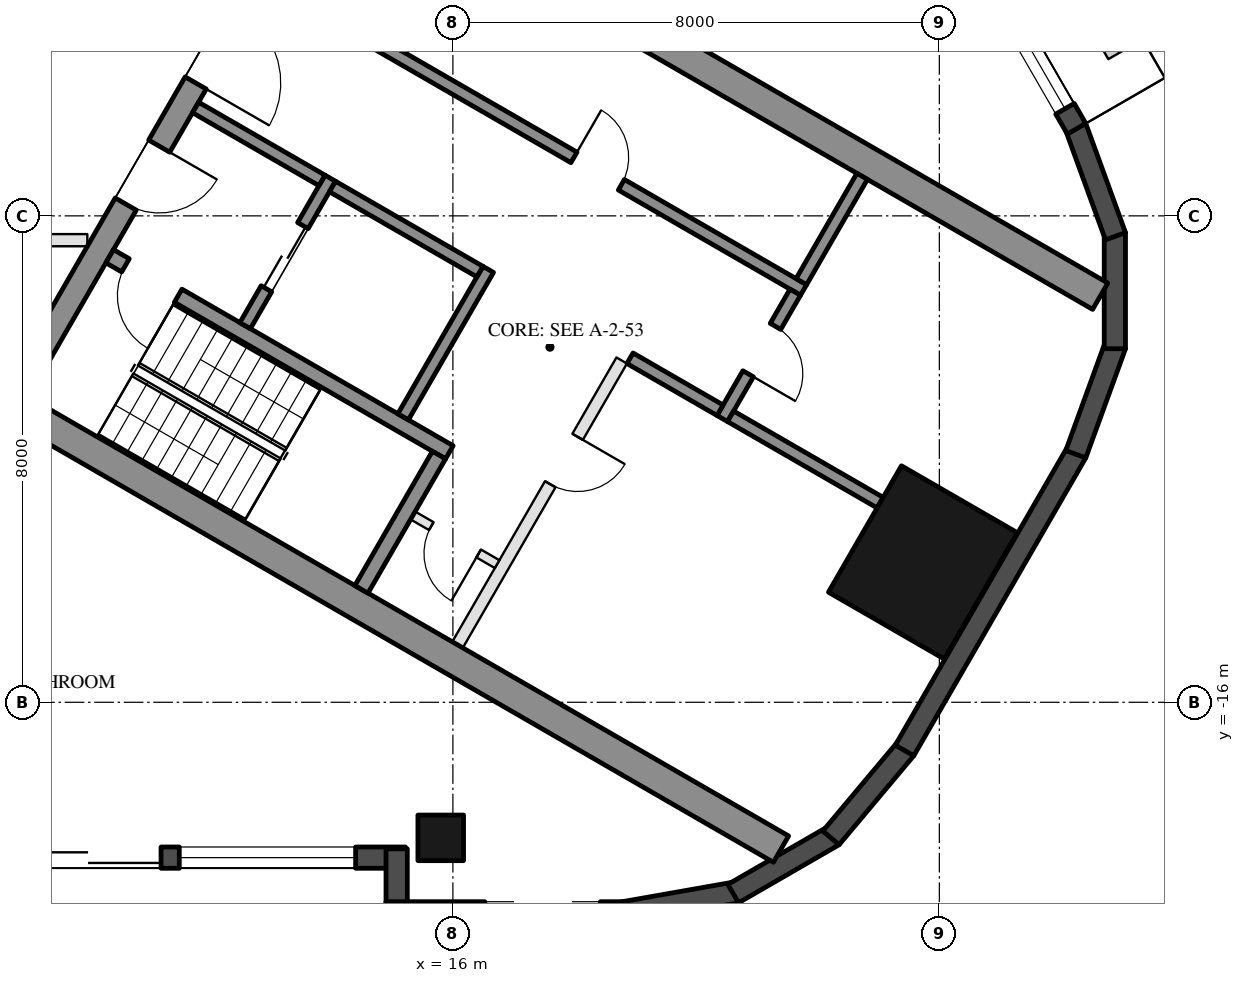
"""IFC4 building model, lengths in metres.
Left out: names, types, materials, properties, quantities, classifications, styles, units other than length and angle.
Written with IfcOpenShell. Run it as: python <this file> out.ifc"""

import sys

from ifc_helpers import new_model, si_unit, direction, frame, frame_2d, origin, origin_2d, place, context, subcontext, project, spatial, rectangle, hollow_rectangle, extrude, element, fill, save


model = new_model("IFC4")
c1 = context("Model", 3, precision=1e-05, world=origin(), true_north=direction((0.0, 1.0)))
c2 = subcontext(c1, "Body", "Model", "MODEL_VIEW")
j1 = project(units=[si_unit("LENGTHUNIT", "METRE"), si_unit("PLANEANGLEUNIT", "RADIAN")], contexts=[c1])
p1 = place(None, origin())
s1 = spatial("IfcSite", under=j1, at=p1, CompositionType="ELEMENT")
p2 = place(p1, origin())
s2 = spatial("IfcBuilding", under=s1, at=p2, CompositionType="ELEMENT")
p3 = place(p2, frame((0.0, 0.0, 228.0)))
s3 = spatial("IfcBuildingStorey", under=s2, at=p3, CompositionType="ELEMENT", Elevation=228.0)
p4 = place(p3, frame((15.8, -18.23, 0.0), z_axis=(0.0, 0.0, 1.0), x_axis=(-1.0, 0.0, 0.0)))
e1 = element("IfcColumn", 1, at=p4, inside=s3, PredefinedType="COLUMN", context=c2, shape_type="SweptSolid", body=[
    extrude(hollow_rectangle(XDim=0.75, YDim=0.75, WallThickness=0.035, at=origin_2d()), origin(), (0.0, 0.0, 1.0), 3.7),
])
p5 = place(p3, frame((23.729, -13.7, 0.0), z_axis=(0.0, 0.0, 1.0), x_axis=(0.5, 0.866025403784, 0.0)))
e2 = element("IfcColumn", 2, at=p5, inside=s3, PredefinedType="COLUMN", context=c2, shape_type="SweptSolid", body=[
    extrude(hollow_rectangle(XDim=2.4, YDim=2.2, WallThickness=0.06, at=origin_2d()), origin(), (0.0, 0.0, 1.0), 3.7),
])
p6 = place(p3, frame((8.48, -18.555, 0.0), z_axis=(0.0, 0.0, 1.0), x_axis=(1.0, 0.0, 0.0)))
e3 = element("IfcWall", 3, at=p6, inside=s3, PredefinedType="SOLIDWALL", context=c2, shape_type="SweptSolid", body=[
    extrude(rectangle(XDim=6.74, YDim=0.35, at=frame_2d((3.37, 0.0))), origin(), (0.0, 0.0, 1.0), 3.45),
])
p7 = place(p6, frame((0.32, 0.0, 0.0)))
e4 = element("IfcOpeningElement", 4, at=p7, cuts=e3, PredefinedType="OPENING", context=c2, shape_type="SweptSolid", body=[
    extrude(rectangle(XDim=2.4, YDim=2.4, at=frame_2d((1.2, 1.2))), frame((0.0, 0.185, 0.0), z_axis=(0.0, -1.0, 0.0), x_axis=(1.0, 0.0, 0.0)), (0.0, 0.0, 1.0), 0.37),
])
p8 = place(p6, frame((3.02, 0.0, 0.3)))
e5 = element("IfcOpeningElement", 5, at=p8, cuts=e3, PredefinedType="OPENING", context=c2, shape_type="SweptSolid", body=[
    extrude(rectangle(XDim=2.9, YDim=2.65, at=frame_2d((1.45, 1.325))), frame((0.0, 0.185, 0.0), z_axis=(0.0, -1.0, 0.0), x_axis=(1.0, 0.0, 0.0)), (0.0, 0.0, 1.0), 0.37),
])
p9 = place(p3, frame((15.075, -18.41, 0.0), z_axis=(0.0, 0.0, 1.0), x_axis=(0.0, -1.0, 0.0)))
e6 = element("IfcWall", 6, at=p9, inside=s3, PredefinedType="SOLIDWALL", context=c2, shape_type="SweptSolid", body=[
    extrude(rectangle(XDim=1.22, YDim=0.35, at=frame_2d((0.61, 0.0))), origin(), (0.0, 0.0, 1.0), 3.45),
])
p10 = place(p3, frame((14.9, -19.455, 0.0), z_axis=(0.0, 0.0, 1.0), x_axis=(1.0, 0.0, 0.0)))
e7 = element("IfcWall", 7, at=p10, inside=s3, PredefinedType="SOLIDWALL", context=c2, shape_type="SweptSolid", body=[
    extrude(rectangle(XDim=3.916, YDim=0.35, at=frame_2d((1.958, 0.0))), origin(), (0.0, 0.0, 1.0), 3.45),
])
p11 = place(p10, frame((1.625, 0.0, 0.3)))
e8 = element("IfcOpeningElement", 8, at=p11, cuts=e7, PredefinedType="OPENING", context=c2, shape_type="SweptSolid", body=[
    extrude(rectangle(XDim=1.9, YDim=2.65, at=frame_2d((0.95, 1.325))), frame((0.0, 0.185, 0.0), z_axis=(0.0, -1.0, 0.0), x_axis=(1.0, 0.0, 0.0)), (0.0, 0.0, 1.0), 0.37),
])
p12 = place(p3, frame((18.785, -19.458, 0.0), z_axis=(0.0, 0.0, 1.0), x_axis=(0.984798995425, 0.173697837091, 0.0)))
e9 = element("IfcWall", 9, at=p12, inside=s3, PredefinedType="SOLIDWALL", context=c2, shape_type="SweptSolid", body=[
    extrude(rectangle(XDim=1.91, YDim=0.35, at=frame_2d((0.955, 0.0))), origin(), (0.0, 0.0, 1.0), 3.45),
])
for number, where, z_axis, x_axis in (
    (10, (20.61, -19.147, 0.0), (0.0, 0.0, 1.0), (0.866, 0.5, 0.0)),
    (11, (22.217, -18.231, 0.0), (0.0, 0.0, 1.0), (0.643, 0.766, 0.0)),
):
    element("IfcWall", number, at=place(p3, frame(where, z_axis=z_axis, x_axis=x_axis)), inside=s3, PredefinedType="SOLIDWALL", context=c2, shape_type="SweptSolid", body=[
        extrude(rectangle(XDim=1.91, YDim=0.35, at=frame_2d((0.955, 0.0))), origin(), (0.0, 0.0, 1.0), 3.45),
    ])
p13 = place(p3, frame((23.427, -16.792, 0.0), z_axis=(0.0, 0.0, 1.0), x_axis=(0.500018773155, 0.866014564827, 0.0)))
e12 = element("IfcWall", 12, at=p13, inside=s3, PredefinedType="SOLIDWALL", context=c2, shape_type="SweptSolid", body=[
    extrude(rectangle(XDim=5.658, YDim=0.35, at=frame_2d((2.829, 0.0))), origin(), (0.0, 0.0, 1.0), 3.45),
])
for number, where, z_axis, x_axis in (
    (13, (26.244, -11.92, 0.0), (0.0, 0.0, 1.0), (0.342, 0.94, 0.0)),
    (14, (26.886, -10.185, 0.0), (0.0, 0.0, 1.0), (0.0, 1.0, 0.0)),
    (15, (26.897, -8.335, 0.0), (0.0, 0.0, 1.0), (-0.342, 0.94, 0.0)),
):
    element("IfcWall", number, at=place(p3, frame(where, z_axis=z_axis, x_axis=x_axis)), inside=s3, PredefinedType="SOLIDWALL", context=c2, shape_type="SweptSolid", body=[
        extrude(rectangle(XDim=1.91, YDim=0.35, at=frame_2d((0.955, 0.0))), origin(), (0.0, 0.0, 1.0), 3.45),
    ])
p14 = place(p3, frame((26.257, -6.567, 0.0), z_axis=(0.0, 0.0, 1.0), x_axis=(-0.500023526245, 0.866011820475, 0.0)))
e16 = element("IfcWall", 16, at=p14, inside=s3, PredefinedType="SOLIDWALL", context=c2, shape_type="SweptSolid", body=[
    extrude(rectangle(XDim=11.816, YDim=0.35, at=frame_2d((5.908, 0.0))), origin(), (0.0, 0.0, 1.0), 3.45),
])
p15 = place(p14, frame((0.38, 0.0, 0.3)))
e17 = element("IfcOpeningElement", 17, at=p15, cuts=e16, PredefinedType="OPENING", context=c2, shape_type="SweptSolid", body=[
    extrude(rectangle(XDim=1.9, YDim=2.65, at=frame_2d((0.95, 1.325))), frame((0.0, 0.185, 0.0), z_axis=(0.0, -1.0, 0.0), x_axis=(1.0, 0.0, 0.0)), (0.0, 0.0, 1.0), 0.37),
])
p16 = place(p14, frame((7.791, 0.0, 0.0)))
e18 = element("IfcOpeningElement", 18, at=p16, cuts=e16, PredefinedType="OPENING", context=c2, shape_type="SweptSolid", body=[
    extrude(rectangle(XDim=2.4, YDim=2.4, at=frame_2d((1.2, 1.2))), frame((0.0, 0.185, 0.0), z_axis=(0.0, -1.0, 0.0), x_axis=(1.0, 0.0, 0.0)), (0.0, 0.0, 1.0), 0.37),
])
p17 = place(p14, frame((3.741, 0.0, 0.3)))
e19 = element("IfcOpeningElement", 19, at=p17, cuts=e16, PredefinedType="OPENING", context=c2, shape_type="SweptSolid", body=[
    extrude(rectangle(XDim=1.7, YDim=2.65, at=frame_2d((0.85, 1.325))), frame((0.0, 0.185, 0.0), z_axis=(0.0, -1.0, 0.0), x_axis=(1.0, 0.0, 0.0)), (0.0, 0.0, 1.0), 0.37),
])
p18 = place(p14, frame((5.741, 0.0, 0.3)))
e20 = element("IfcOpeningElement", 20, at=p18, cuts=e16, PredefinedType="OPENING", context=c2, shape_type="SweptSolid", body=[
    extrude(rectangle(XDim=1.7, YDim=2.65, at=frame_2d((0.85, 1.325))), frame((0.0, 0.185, 0.0), z_axis=(0.0, -1.0, 0.0), x_axis=(1.0, 0.0, 0.0)), (0.0, 0.0, 1.0), 0.37),
])
for number, where, z_axis, x_axis in (
    (21, (8.547, -10.997, 0.0), (0.0, 0.0, 1.0), (0.866, -0.5, 0.0)),
    (22, (13.797, -1.903, 0.0), (0.0, 0.0, 1.0), (0.866, -0.5, 0.0)),
):
    element("IfcWall", number, at=place(p3, frame(where, z_axis=z_axis, x_axis=x_axis)), inside=s3, PredefinedType="SHEAR", context=c2, shape_type="SweptSolid", body=[
        extrude(rectangle(XDim=14.837, YDim=0.5, at=frame_2d((7.418, 0.0))), origin(), (0.0, 0.0, 1.0), 3.45),
    ])
p19 = place(p3, frame((8.845, -10.88, 0.0), z_axis=(0.0, 0.0, 1.0), x_axis=(0.500004234368, 0.866022959057, 0.0)))
e23 = element("IfcWall", 23, at=p19, inside=s3, PredefinedType="SHEAR", context=c2, shape_type="SweptSolid", body=[
    extrude(rectangle(XDim=10.0, YDim=0.4, at=frame_2d((5.0, 0.0))), origin(), (0.0, 0.0, 1.0), 3.45),
])
p20 = place(p19, frame((3.55, 0.0, 0.0)))
e24 = element("IfcOpeningElement", 24, at=p20, cuts=e23, PredefinedType="OPENING", context=c2, shape_type="SweptSolid", body=[
    extrude(rectangle(XDim=1.1, YDim=2.1, at=frame_2d((0.55, 1.05))), frame((0.0, 0.21, 0.0), z_axis=(0.0, -1.0, 0.0), x_axis=(1.0, 0.0, 0.0)), (0.0, 0.0, 1.0), 0.42),
])
p21 = place(p19, frame((5.85, 0.0, 0.0)))
e25 = element("IfcOpeningElement", 25, at=p21, cuts=e23, PredefinedType="OPENING", context=c2, shape_type="SweptSolid", body=[
    extrude(rectangle(XDim=1.4, YDim=2.1, at=frame_2d((0.7, 1.05))), frame((0.0, 0.21, 0.0), z_axis=(0.0, -1.0, 0.0), x_axis=(1.0, 0.0, 0.0)), (0.0, 0.0, 1.0), 0.42),
])
p22 = place(p3, frame((10.356, -8.664, 0.0), z_axis=(0.0, 0.0, 1.0), x_axis=(0.866028629588, -0.499994412703, 0.0)))
e26 = element("IfcWall", 26, at=p22, inside=s3, PredefinedType="SHEAR", context=c2, shape_type="SweptSolid", body=[
    extrude(rectangle(XDim=6.45, YDim=0.25, at=frame_2d((3.225, 0.0))), origin(), (0.0, 0.0, 1.0), 3.45),
])
p23 = place(p22, frame((0.3, 0.0, 0.0)))
e27 = element("IfcOpeningElement", 27, at=p23, cuts=e26, PredefinedType="OPENING", context=c2, shape_type="SweptSolid", body=[
    extrude(rectangle(XDim=1.0, YDim=2.1, at=frame_2d((0.5, 1.05))), frame((0.0, 0.135, 0.0), z_axis=(0.0, -1.0, 0.0), x_axis=(1.0, 0.0, 0.0)), (0.0, 0.0, 1.0), 0.27),
])
p24 = place(p3, frame((14.496, -14.143, 0.0), z_axis=(0.0, 0.0, 1.0), x_axis=(0.500062241894, 0.865989465428, 0.0)))
e28 = element("IfcWall", 28, at=p24, inside=s3, PredefinedType="SHEAR", context=c2, shape_type="SweptSolid", body=[
    extrude(rectangle(XDim=2.55, YDim=0.25, at=frame_2d((1.275, 0.0))), origin(), (0.0, 0.0, 1.0), 3.45),
])
p25 = place(p3, frame((15.181, -11.305, 0.0), z_axis=(0.0, 0.0, 1.0), x_axis=(0.49994636267, 0.866056369097, 0.0)))
e29 = element("IfcWall", 29, at=p25, inside=s3, PredefinedType="SHEAR", context=c2, shape_type="SweptSolid", body=[
    extrude(rectangle(XDim=2.8, YDim=0.2, at=frame_2d((1.4, 0.0))), origin(), (0.0, 0.0, 1.0), 3.45),
])
p26 = place(p3, frame((12.583, -9.805, 0.0), z_axis=(0.0, 0.0, 1.0), x_axis=(0.49994636267, 0.866056369097, 0.0)))
e30 = element("IfcWall", 30, at=p26, inside=s3, PredefinedType="SHEAR", context=c2, shape_type="SweptSolid", body=[
    extrude(rectangle(XDim=2.8, YDim=0.2, at=frame_2d((1.4, 0.0))), origin(), (0.0, 0.0, 1.0), 3.45),
])
p27 = place(p26, frame((0.7, 0.0, 0.0)))
e31 = element("IfcOpeningElement", 31, at=p27, cuts=e30, PredefinedType="OPENING", context=c2, shape_type="SweptSolid", body=[
    extrude(rectangle(XDim=1.2, YDim=2.1, at=frame_2d((0.6, 1.05))), frame((0.0, 0.11, 0.0), z_axis=(0.0, -1.0, 0.0), x_axis=(1.0, 0.0, 0.0)), (0.0, 0.0, 1.0), 0.22),
])
p28 = place(p3, frame((11.768, -6.217, 0.0), z_axis=(0.0, 0.0, 1.0), x_axis=(0.866050077142, -0.499957262057, 0.0)))
e32 = element("IfcWall", 32, at=p28, inside=s3, PredefinedType="SHEAR", context=c2, shape_type="SweptSolid", body=[
    extrude(rectangle(XDim=2.4, YDim=0.2, at=frame_2d((1.2, 0.0))), origin(), (0.0, 0.0, 1.0), 3.45),
])
p29 = place(p3, frame((14.02, -7.517, 0.0), z_axis=(0.0, 0.0, 1.0), x_axis=(0.866034573852, -0.49998411664, 0.0)))
e33 = element("IfcWall", 33, at=p29, inside=s3, PredefinedType="SHEAR", context=c2, shape_type="SweptSolid", body=[
    extrude(rectangle(XDim=2.8, YDim=0.2, at=frame_2d((1.4, 0.0))), origin(), (0.0, 0.0, 1.0), 3.45),
])
p30 = place(p3, frame((12.968, -4.138, 0.0), z_axis=(0.0, 0.0, 1.0), x_axis=(0.866028328073, -0.49999493495, 0.0)))
e34 = element("IfcWall", 34, at=p30, inside=s3, PredefinedType="SHEAR", context=c2, shape_type="SweptSolid", body=[
    extrude(rectangle(XDim=10.16, YDim=0.2, at=frame_2d((5.08, 0.0))), origin(), (0.0, 0.0, 1.0), 3.45),
])
p31 = place(p30, frame((5.8, 0.0, 0.0)))
e35 = element("IfcOpeningElement", 35, at=p31, cuts=e34, PredefinedType="OPENING", context=c2, shape_type="SweptSolid", body=[
    extrude(rectangle(XDim=0.9, YDim=2.1, at=frame_2d((0.45, 1.05))), frame((0.0, 0.11, 0.0), z_axis=(0.0, -1.0, 0.0), x_axis=(1.0, 0.0, 0.0)), (0.0, 0.0, 1.0), 0.22),
])
p32 = place(p3, frame((20.43, -11.333, 0.0), z_axis=(0.0, 0.0, 1.0), x_axis=(0.500001309137, 0.866024647952, 0.0)))
e36 = element("IfcWall", 36, at=p32, inside=s3, PredefinedType="SHEAR", context=c2, shape_type="SweptSolid", body=[
    extrude(rectangle(XDim=2.4, YDim=0.2, at=frame_2d((1.2, 0.0))), origin(), (0.0, 0.0, 1.0), 3.45),
])
p33 = place(p32, frame((0.85, 0.0, 0.0)))
e37 = element("IfcOpeningElement", 37, at=p33, cuts=e36, PredefinedType="OPENING", context=c2, shape_type="SweptSolid", body=[
    extrude(rectangle(XDim=0.9, YDim=2.1, at=frame_2d((0.45, 1.05))), frame((0.0, 0.11, 0.0), z_axis=(0.0, -1.0, 0.0), x_axis=(1.0, 0.0, 0.0)), (0.0, 0.0, 1.0), 0.22),
])
p34 = place(p3, frame((18.913, -10.342, 0.0), z_axis=(0.0, 0.0, 1.0), x_axis=(0.866038183914, -0.499977863513, 0.0)))
e38 = element("IfcWall", 38, at=p34, inside=s3, PredefinedType="SHEAR", context=c2, shape_type="SweptSolid", body=[
    extrude(rectangle(XDim=1.71, YDim=0.2, at=frame_2d((0.855, 0.0))), origin(), (0.0, 0.0, 1.0), 3.45),
])
for number, where, z_axis, x_axis in (
    (39, (15.131, -5.272, 0.0), (0.0, 0.0, 1.0), (0.5, 0.866, 0.0)),
    (40, (21.73, -9.082, 0.0), (0.0, 0.0, 1.0), (0.5, 0.866, 0.0)),
):
    element("IfcWall", number, at=place(p3, frame(where, z_axis=z_axis, x_axis=x_axis)), inside=s3, PredefinedType="SHEAR", context=c2, shape_type="SweptSolid", body=[
        extrude(rectangle(XDim=2.0, YDim=0.2, at=frame_2d((1.0, 0.0))), origin(), (0.0, 0.0, 1.0), 3.45),
    ])
p35 = place(p3, frame((20.567, -11.297, 0.0), z_axis=(0.0, 0.0, 1.0), x_axis=(0.866055327414, -0.49994816717, 0.0)))
e41 = element("IfcWall", 41, at=p35, inside=s3, PredefinedType="SHEAR", context=c2, shape_type="SweptSolid", body=[
    extrude(rectangle(XDim=2.84, YDim=0.2, at=frame_2d((1.42, 0.0))), origin(), (0.0, 0.0, 1.0), 3.45),
])
p36 = place(p3, frame((16.076, -15.055, 0.0), z_axis=(0.0, 0.0, 1.0), x_axis=(0.499995103361, 0.866028230842, 0.0)))
e42 = element("IfcWall", 42, at=p36, inside=s3, PredefinedType="PARTITIONING", context=c2, shape_type="SweptSolid", body=[
    extrude(rectangle(XDim=5.4, YDim=0.2, at=frame_2d((2.7, 0.0))), origin(), (0.0, 0.0, 1.0), 3.45),
])
p37 = place(p36, frame((3.05, 0.0, 0.0)))
e43 = element("IfcOpeningElement", 43, at=p37, cuts=e42, PredefinedType="OPENING", context=c2, shape_type="SweptSolid", body=[
    extrude(rectangle(XDim=0.9, YDim=2.1, at=frame_2d((0.45, 1.05))), frame((0.0, 0.11, 0.0), z_axis=(0.0, -1.0, 0.0), x_axis=(1.0, 0.0, 0.0)), (0.0, 0.0, 1.0), 0.22),
])
p38 = place(p3, frame((15.342, -12.928, 0.0), z_axis=(0.0, 0.0, 1.0), x_axis=(0.865989903783, -0.500061482766, 0.0)))
e44 = element("IfcWall", 44, at=p38, inside=s3, PredefinedType="PARTITIONING", context=c2, shape_type="SweptSolid", body=[
    extrude(rectangle(XDim=1.6, YDim=0.15, at=frame_2d((0.8, 0.0))), origin(), (0.0, 0.0, 1.0), 3.45),
])
p39 = place(p38, frame((0.35, 0.0, 0.0)))
e45 = element("IfcOpeningElement", 45, at=p39, cuts=e44, PredefinedType="OPENING", context=c2, shape_type="SweptSolid", body=[
    extrude(rectangle(XDim=0.9, YDim=2.1, at=frame_2d((0.45, 1.05))), frame((0.0, 0.085, 0.0), z_axis=(0.0, -1.0, 0.0), x_axis=(1.0, 0.0, 0.0)), (0.0, 0.0, 1.0), 0.17),
])
p40 = place(p3, frame((9.988, -8.4, 0.0), z_axis=(0.0, 0.0, 1.0), x_axis=(-1.0, 0.0, 0.0)))
e46 = element("IfcWall", 46, at=p40, inside=s3, PredefinedType="PARTITIONING", context=c2, shape_type="SweptSolid", body=[
    extrude(rectangle(XDim=3.788, YDim=0.2, at=frame_2d((1.894, 0.0))), origin(), (0.0, 0.0, 1.0), 2.76),
])
p41 = place(p40, frame((1.394, 0.0, 0.0)))
e47 = element("IfcOpeningElement", 47, at=p41, cuts=e46, PredefinedType="OPENING", context=c2, shape_type="SweptSolid", body=[
    extrude(rectangle(XDim=1.0, YDim=2.1, at=frame_2d((0.5, 1.05))), frame((0.0, 0.11, 0.0), z_axis=(0.0, -1.0, 0.0), x_axis=(1.0, 0.0, 0.0)), (0.0, 0.0, 1.0), 0.22),
])
p42 = place(p7, frame((2.4, 0.0, 0.0), z_axis=(0.0, 0.0, 1.0), x_axis=(-1.0, 0.0, 0.0)))
e48 = element("IfcDoor", 48, at=p42, inside=s3, OperationType="SLIDING_TO_LEFT", PredefinedType="DOOR", context=c2, shape_type="SweptSolid", body=[
    extrude(rectangle(XDim=2.4, YDim=2.4, at=frame_2d((1.2, 1.2))), frame((0.0, 0.025, 0.0), z_axis=(0.0, -1.0, 0.0), x_axis=(1.0, 0.0, 0.0)), (0.0, 0.0, 1.0), 0.05),
])
fill(e4, e48)
p43 = place(p8, origin())
e49 = element("IfcWindow", 49, at=p43, inside=s3, PartitioningType="SINGLE_PANEL", PredefinedType="WINDOW", context=c2, shape_type="SweptSolid", body=[
    extrude(rectangle(XDim=2.9, YDim=2.65, at=frame_2d((1.45, 1.325))), frame((0.0, 0.03, 0.0), z_axis=(0.0, -1.0, 0.0), x_axis=(1.0, 0.0, 0.0)), (0.0, 0.0, 1.0), 0.06),
])
fill(e5, e49)
p44 = place(p15, origin())
e50 = element("IfcWindow", 50, at=p44, inside=s3, PartitioningType="SINGLE_PANEL", PredefinedType="WINDOW", context=c2, shape_type="SweptSolid", body=[
    extrude(rectangle(XDim=1.9, YDim=2.65, at=frame_2d((0.95, 1.325))), frame((0.0, 0.03, 0.0), z_axis=(0.0, -1.0, 0.0), x_axis=(1.0, 0.0, 0.0)), (0.0, 0.0, 1.0), 0.06),
])
fill(e17, e50)
p45 = place(p27, origin())
e51 = element("IfcDoor", 51, at=p45, inside=s3, OperationType="DOUBLE_DOOR_SLIDING", PredefinedType="DOOR", context=c2, shape_type="SweptSolid", body=[
    extrude(rectangle(XDim=1.2, YDim=2.1, at=frame_2d((0.6, 1.05))), frame((0.0, 0.025, 0.0), z_axis=(0.0, -1.0, 0.0), x_axis=(1.0, 0.0, 0.0)), (0.0, 0.0, 1.0), 0.05),
])
fill(e31, e51)
p46 = place(p39, frame((0.9, 0.0, 0.0), z_axis=(0.0, 0.0, 1.0), x_axis=(-1.0, 0.0, 0.0)))
e52 = element("IfcDoor", 52, at=p46, inside=s3, OperationType="SINGLE_SWING_LEFT", PredefinedType="DOOR", context=c2, shape_type="SweptSolid", body=[
    extrude(rectangle(XDim=0.9, YDim=2.1, at=frame_2d((0.45, 1.05))), frame((0.0, 0.025, 0.0), z_axis=(0.0, -1.0, 0.0), x_axis=(1.0, 0.0, 0.0)), (0.0, 0.0, 1.0), 0.05),
])
fill(e45, e52)
p47 = place(p31, origin())
e53 = element("IfcDoor", 53, at=p47, inside=s3, OperationType="SINGLE_SWING_LEFT", PredefinedType="DOOR", context=c2, shape_type="SweptSolid", body=[
    extrude(rectangle(XDim=0.9, YDim=2.1, at=frame_2d((0.45, 1.05))), frame((0.0, 0.025, 0.0), z_axis=(0.0, -1.0, 0.0), x_axis=(1.0, 0.0, 0.0)), (0.0, 0.0, 1.0), 0.05),
])
fill(e35, e53)
p48 = place(p33, frame((0.9, 0.0, 0.0), z_axis=(0.0, 0.0, 1.0), x_axis=(-1.0, 0.0, 0.0)))
e54 = element("IfcDoor", 54, at=p48, inside=s3, OperationType="SINGLE_SWING_RIGHT", PredefinedType="DOOR", context=c2, shape_type="SweptSolid", body=[
    extrude(rectangle(XDim=0.9, YDim=2.1, at=frame_2d((0.45, 1.05))), frame((0.0, 0.025, 0.0), z_axis=(0.0, -1.0, 0.0), x_axis=(1.0, 0.0, 0.0)), (0.0, 0.0, 1.0), 0.05),
])
fill(e37, e54)
p49 = place(p37, frame((0.9, 0.0, 0.0), z_axis=(0.0, 0.0, 1.0), x_axis=(-1.0, 0.0, 0.0)))
e55 = element("IfcDoor", 55, at=p49, inside=s3, OperationType="SINGLE_SWING_LEFT", PredefinedType="DOOR", context=c2, shape_type="SweptSolid", body=[
    extrude(rectangle(XDim=0.9, YDim=2.1, at=frame_2d((0.45, 1.05))), frame((0.0, 0.025, 0.0), z_axis=(0.0, -1.0, 0.0), x_axis=(1.0, 0.0, 0.0)), (0.0, 0.0, 1.0), 0.05),
])
fill(e43, e55)
p50 = place(p20, frame((1.1, 0.0, 0.0), z_axis=(0.0, 0.0, 1.0), x_axis=(-1.0, 0.0, 0.0)))
e56 = element("IfcDoor", 56, at=p50, inside=s3, OperationType="SINGLE_SWING_LEFT", PredefinedType="DOOR", context=c2, shape_type="SweptSolid", body=[
    extrude(rectangle(XDim=1.1, YDim=2.1, at=frame_2d((0.55, 1.05))), frame((0.0, 0.025, 0.0), z_axis=(0.0, -1.0, 0.0), x_axis=(1.0, 0.0, 0.0)), (0.0, 0.0, 1.0), 0.05),
])
fill(e24, e56)
p51 = place(p21, frame((1.4, 0.0, 0.0), z_axis=(0.0, 0.0, 1.0), x_axis=(-1.0, 0.0, 0.0)))
e57 = element("IfcDoor", 57, at=p51, inside=s3, OperationType="DOUBLE_DOOR_SINGLE_SWING", PredefinedType="DOOR", context=c2, shape_type="SweptSolid", body=[
    extrude(rectangle(XDim=1.4, YDim=2.1, at=frame_2d((0.7, 1.05))), frame((0.0, 0.025, 0.0), z_axis=(0.0, -1.0, 0.0), x_axis=(1.0, 0.0, 0.0)), (0.0, 0.0, 1.0), 0.05),
])
fill(e25, e57)
p52 = place(p23, frame((1.0, 0.0, 0.0), z_axis=(0.0, 0.0, 1.0), x_axis=(-1.0, 0.0, 0.0)))
e58 = element("IfcDoor", 58, at=p52, inside=s3, OperationType="SINGLE_SWING_LEFT", PredefinedType="DOOR", context=c2, shape_type="SweptSolid", body=[
    extrude(rectangle(XDim=1.0, YDim=2.1, at=frame_2d((0.5, 1.05))), frame((0.0, 0.025, 0.0), z_axis=(0.0, -1.0, 0.0), x_axis=(1.0, 0.0, 0.0)), (0.0, 0.0, 1.0), 0.05),
])
fill(e27, e58)
save(model, sys.argv[1])
